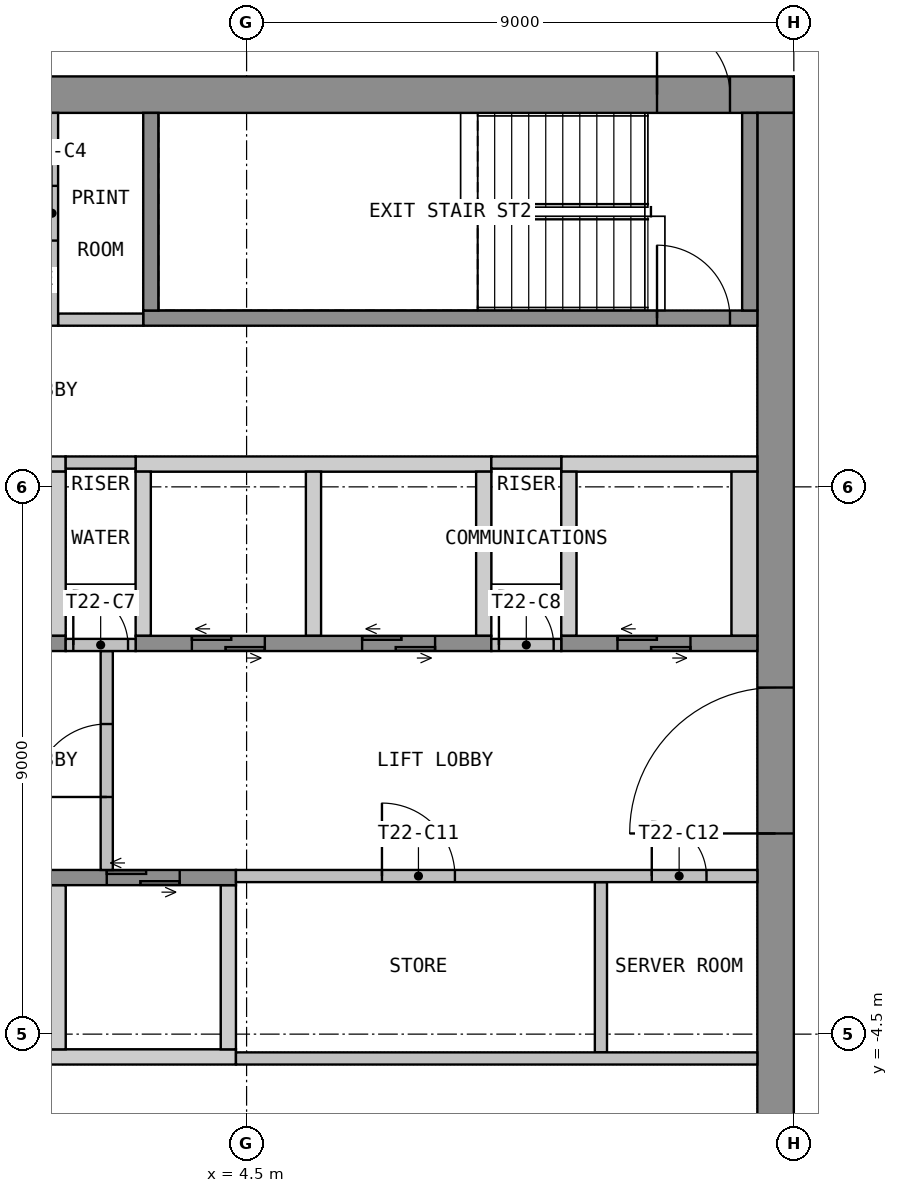
"""IFC4 building model, lengths in metres.
Left out: names, types, materials, properties, quantities, classifications, styles, units other than length and angle.
Written with IfcOpenShell. Run it as: python <this file> out.ifc"""

import sys

from ifc_helpers import new_model, si_unit, direction, frame, frame_2d, origin, place, context, subcontext, project, spatial, polyline, rectangle, outline, extrude, element, fill, save


model = new_model("IFC4")
c1 = context("Model", 3, precision=1e-05, world=origin(), true_north=direction((0.0, 1.0)))
c2 = subcontext(c1, "Body", "Model", "MODEL_VIEW")
j1 = project(units=[si_unit("LENGTHUNIT", "METRE"), si_unit("PLANEANGLEUNIT", "RADIAN")], contexts=[c1])
p1 = place(None, origin())
s1 = spatial("IfcSite", under=j1, at=p1, CompositionType="ELEMENT")
p2 = place(p1, origin())
s2 = spatial("IfcBuilding", under=s1, at=p2, CompositionType="ELEMENT")
p3 = place(p2, frame((0.0, 0.0, 298.2)))
s3 = spatial("IfcBuildingStorey", under=s2, at=p3, CompositionType="ELEMENT", Elevation=298.2)
p4 = place(p3, frame((-13.5, 10.95, 0.0), z_axis=(0.0, 0.0, 1.0), x_axis=(1.0, 0.0, 0.0)))
e1 = element("IfcWall", 1, at=p4, inside=s3, PredefinedType="SHEAR", context=c2, shape_type="SweptSolid", body=[
    extrude(rectangle(XDim=27.0, YDim=0.6, at=frame_2d((13.5, 0.0))), origin(), (0.0, 0.0, 1.0), 3.575),
])
p5 = place(p4, frame((12.3, 0.0, 0.0)))
e2 = element("IfcOpeningElement", 2, at=p5, cuts=e1, PredefinedType="OPENING", context=c2, shape_type="SweptSolid", body=[
    extrude(rectangle(XDim=2.4, YDim=2.1, at=frame_2d((1.2, 1.05))), frame((0.0, 0.31, 0.0), z_axis=(0.0, -1.0, 0.0), x_axis=(1.0, 0.0, 0.0)), (0.0, 0.0, 1.0), 0.62),
])
p6 = place(p4, frame((1.05, 0.0, 0.0)))
e3 = element("IfcOpeningElement", 3, at=p6, cuts=e1, PredefinedType="OPENING", context=c2, shape_type="SweptSolid", body=[
    extrude(rectangle(XDim=1.2, YDim=2.1, at=frame_2d((0.6, 1.05))), frame((0.0, 0.31, 0.0), z_axis=(0.0, -1.0, 0.0), x_axis=(1.0, 0.0, 0.0)), (0.0, 0.0, 1.0), 0.62),
])
p7 = place(p4, frame((24.75, 0.0, 0.0)))
e4 = element("IfcOpeningElement", 4, at=p7, cuts=e1, PredefinedType="OPENING", context=c2, shape_type="SweptSolid", body=[
    extrude(rectangle(XDim=1.2, YDim=2.1, at=frame_2d((0.6, 1.05))), frame((0.0, 0.31, 0.0), z_axis=(0.0, -1.0, 0.0), x_axis=(1.0, 0.0, 0.0)), (0.0, 0.0, 1.0), 0.62),
])
p8 = place(p3, frame((13.2, -10.65, 0.0), z_axis=(0.0, 0.0, 1.0), x_axis=(0.0, 1.0, 0.0)))
e5 = element("IfcWall", 5, at=p8, inside=s3, PredefinedType="SHEAR", context=c2, shape_type="SweptSolid", body=[
    extrude(rectangle(XDim=21.3, YDim=0.6, at=frame_2d((10.65, 0.0))), origin(), (0.0, 0.0, 1.0), 3.575),
])
p9 = place(p8, frame((9.45, 0.0, 0.0)))
e6 = element("IfcOpeningElement", 6, at=p9, cuts=e5, PredefinedType="OPENING", context=c2, shape_type="SweptSolid", body=[
    extrude(rectangle(XDim=2.4, YDim=2.1, at=frame_2d((1.2, 1.05))), frame((0.0, 0.31, 0.0), z_axis=(0.0, -1.0, 0.0), x_axis=(1.0, 0.0, 0.0)), (0.0, 0.0, 1.0), 0.62),
])
p10 = place(p3, origin())
e7 = element("IfcWall", 7, at=p10, inside=s3, PredefinedType="SHEAR", context=c2, shape_type="SweptSolid", body=[
    extrude(outline(polyline([(-1.525, 4.75), (1.525, 4.75), (1.525, 5.0), (-1.525, 5.0), (-1.525, 4.75)])), origin(), (0.0, 0.0, 1.0), 3.575),
])
p11 = place(p3, origin())
e8 = element("IfcWall", 8, at=p11, inside=s3, PredefinedType="SHEAR", context=c2, shape_type="SweptSolid", body=[
    extrude(outline(polyline([(2.675, 4.75), (8.525, 4.75), (8.525, 5.0), (2.675, 5.0), (2.675, 4.75)])), origin(), (0.0, 0.0, 1.0), 3.575),
])
p12 = place(p3, origin())
e9 = element("IfcWall", 9, at=p12, inside=s3, PredefinedType="SHEAR", context=c2, shape_type="SweptSolid", body=[
    extrude(outline(polyline([(9.675, 4.75), (12.9, 4.75), (12.9, 5.0), (9.675, 5.0), (9.675, 4.75)])), origin(), (0.0, 0.0, 1.0), 3.575),
])
p13 = place(p3, origin())
e10 = element("IfcWall", 10, at=p13, inside=s3, PredefinedType="SHEAR", context=c2, shape_type="SweptSolid", body=[
    extrude(outline(polyline([(1.275, 2.05), (1.525, 2.05), (1.525, 4.75), (1.275, 4.75), (1.275, 2.05)])), origin(), (0.0, 0.0, 1.0), 3.575),
])
p14 = place(p3, origin())
e11 = element("IfcWall", 11, at=p14, inside=s3, PredefinedType="SHEAR", context=c2, shape_type="SweptSolid", body=[
    extrude(outline(polyline([(2.675, 2.05), (2.925, 2.05), (2.925, 4.75), (2.675, 4.75), (2.675, 2.05)])), origin(), (0.0, 0.0, 1.0), 3.575),
])
p15 = place(p3, origin())
e12 = element("IfcWall", 12, at=p15, inside=s3, PredefinedType="SHEAR", context=c2, shape_type="SweptSolid", body=[
    extrude(outline(polyline([(5.475, 2.05), (5.725, 2.05), (5.725, 4.75), (5.475, 4.75), (5.475, 2.05)])), origin(), (0.0, 0.0, 1.0), 3.575),
])
p16 = place(p3, origin())
e13 = element("IfcWall", 13, at=p16, inside=s3, PredefinedType="SHEAR", context=c2, shape_type="SweptSolid", body=[
    extrude(outline(polyline([(8.275, 2.05), (8.525, 2.05), (8.525, 4.75), (8.275, 4.75), (8.275, 2.05)])), origin(), (0.0, 0.0, 1.0), 3.575),
])
p17 = place(p3, origin())
e14 = element("IfcWall", 14, at=p17, inside=s3, PredefinedType="SHEAR", context=c2, shape_type="SweptSolid", body=[
    extrude(outline(polyline([(9.675, 2.05), (9.925, 2.05), (9.925, 4.75), (9.675, 4.75), (9.675, 2.05)])), origin(), (0.0, 0.0, 1.0), 3.575),
])
p18 = place(p3, origin())
e15 = element("IfcWall", 15, at=p18, inside=s3, PredefinedType="SHEAR", context=c2, shape_type="SweptSolid", body=[
    extrude(outline(polyline([(12.475, 2.05), (12.9, 2.05), (12.9, 4.75), (12.475, 4.75), (12.475, 2.05)])), origin(), (0.0, 0.0, 1.0), 3.575),
])
p19 = place(p3, frame((-1.525, 1.925, 0.0), z_axis=(0.0, 0.0, 1.0), x_axis=(1.0, 0.0, 0.0)))
e16 = element("IfcWall", 16, at=p19, inside=s3, PredefinedType="SHEAR", context=c2, shape_type="SweptSolid", body=[
    extrude(rectangle(XDim=3.05, YDim=0.25, at=frame_2d((1.525, 0.0))), origin(), (0.0, 0.0, 1.0), 3.575),
])
p20 = place(p19, frame((0.925, 0.0, 0.0)))
e17 = element("IfcOpeningElement", 17, at=p20, cuts=e16, PredefinedType="OPENING", context=c2, shape_type="SweptSolid", body=[
    extrude(rectangle(XDim=1.2, YDim=2.1, at=frame_2d((0.6, 1.05))), frame((0.0, 0.135, 0.0), z_axis=(0.0, -1.0, 0.0), x_axis=(1.0, 0.0, 0.0)), (0.0, 0.0, 1.0), 0.27),
])
p21 = place(p3, frame((2.675, 1.925, 0.0), z_axis=(0.0, 0.0, 1.0), x_axis=(1.0, 0.0, 0.0)))
e18 = element("IfcWall", 18, at=p21, inside=s3, PredefinedType="SHEAR", context=c2, shape_type="SweptSolid", body=[
    extrude(rectangle(XDim=5.85, YDim=0.25, at=frame_2d((2.925, 0.0))), origin(), (0.0, 0.0, 1.0), 3.575),
])
p22 = place(p21, frame((0.925, 0.0, 0.0)))
e19 = element("IfcOpeningElement", 19, at=p22, cuts=e18, PredefinedType="OPENING", context=c2, shape_type="SweptSolid", body=[
    extrude(rectangle(XDim=1.2, YDim=2.1, at=frame_2d((0.6, 1.05))), frame((0.0, 0.135, 0.0), z_axis=(0.0, -1.0, 0.0), x_axis=(1.0, 0.0, 0.0)), (0.0, 0.0, 1.0), 0.27),
])
p23 = place(p21, frame((3.725, 0.0, 0.0)))
e20 = element("IfcOpeningElement", 20, at=p23, cuts=e18, PredefinedType="OPENING", context=c2, shape_type="SweptSolid", body=[
    extrude(rectangle(XDim=1.2, YDim=2.1, at=frame_2d((0.6, 1.05))), frame((0.0, 0.135, 0.0), z_axis=(0.0, -1.0, 0.0), x_axis=(1.0, 0.0, 0.0)), (0.0, 0.0, 1.0), 0.27),
])
p24 = place(p3, frame((9.675, 1.925, 0.0), z_axis=(0.0, 0.0, 1.0), x_axis=(1.0, 0.0, 0.0)))
e21 = element("IfcWall", 21, at=p24, inside=s3, PredefinedType="SHEAR", context=c2, shape_type="SweptSolid", body=[
    extrude(rectangle(XDim=3.225, YDim=0.25, at=frame_2d((1.612, 0.0))), origin(), (0.0, 0.0, 1.0), 3.575),
])
p25 = place(p24, frame((0.925, 0.0, 0.0)))
e22 = element("IfcOpeningElement", 22, at=p25, cuts=e21, PredefinedType="OPENING", context=c2, shape_type="SweptSolid", body=[
    extrude(rectangle(XDim=1.2, YDim=2.1, at=frame_2d((0.6, 1.05))), frame((0.0, 0.135, 0.0), z_axis=(0.0, -1.0, 0.0), x_axis=(1.0, 0.0, 0.0)), (0.0, 0.0, 1.0), 0.27),
])
p26 = place(p3, origin())
e23 = element("IfcWall", 23, at=p26, inside=s3, PredefinedType="SHEAR", context=c2, shape_type="SweptSolid", body=[
    extrude(outline(polyline([(-1.525, -5.0), (4.325, -5.0), (4.325, -4.75), (-1.525, -4.75), (-1.525, -5.0)])), origin(), (0.0, 0.0, 1.0), 3.575),
])
p27 = place(p3, origin())
e24 = element("IfcWall", 24, at=p27, inside=s3, PredefinedType="SHEAR", context=c2, shape_type="SweptSolid", body=[
    extrude(outline(polyline([(1.275, -4.75), (1.525, -4.75), (1.525, -2.05), (1.275, -2.05), (1.275, -4.75)])), origin(), (0.0, 0.0, 1.0), 3.575),
])
p28 = place(p3, origin())
e25 = element("IfcWall", 25, at=p28, inside=s3, PredefinedType="SHEAR", context=c2, shape_type="SweptSolid", body=[
    extrude(outline(polyline([(4.075, -4.75), (4.325, -4.75), (4.325, -2.05), (4.075, -2.05), (4.075, -4.75)])), origin(), (0.0, 0.0, 1.0), 3.575),
])
p29 = place(p3, frame((-1.525, -1.925, 0.0), z_axis=(0.0, 0.0, 1.0), x_axis=(1.0, 0.0, 0.0)))
e26 = element("IfcWall", 26, at=p29, inside=s3, PredefinedType="SHEAR", context=c2, shape_type="SweptSolid", body=[
    extrude(rectangle(XDim=5.85, YDim=0.25, at=frame_2d((2.925, 0.0))), origin(), (0.0, 0.0, 1.0), 3.575),
])
p30 = place(p29, frame((0.925, 0.0, 0.0)))
e27 = element("IfcOpeningElement", 27, at=p30, cuts=e26, PredefinedType="OPENING", context=c2, shape_type="SweptSolid", body=[
    extrude(rectangle(XDim=1.2, YDim=2.1, at=frame_2d((0.6, 1.05))), frame((0.0, 0.135, 0.0), z_axis=(0.0, -1.0, 0.0), x_axis=(1.0, 0.0, 0.0)), (0.0, 0.0, 1.0), 0.27),
])
p31 = place(p29, frame((3.725, 0.0, 0.0)))
e28 = element("IfcOpeningElement", 28, at=p31, cuts=e26, PredefinedType="OPENING", context=c2, shape_type="SweptSolid", body=[
    extrude(rectangle(XDim=1.2, YDim=2.1, at=frame_2d((0.6, 1.05))), frame((0.0, 0.135, 0.0), z_axis=(0.0, -1.0, 0.0), x_axis=(1.0, 0.0, 0.0)), (0.0, 0.0, 1.0), 0.27),
])
p32 = place(p3, frame((2.2, -1.8, 0.0), z_axis=(0.0, 0.0, 1.0), x_axis=(0.0, 1.0, 0.0)))
e29 = element("IfcWall", 29, at=p32, inside=s3, PredefinedType="PARTITIONING", context=c2, shape_type="SweptSolid", body=[
    extrude(rectangle(XDim=3.6, YDim=0.2, at=frame_2d((1.8, 0.0))), origin(), (0.0, 0.0, 1.0), 3.575),
])
p33 = place(p32, frame((1.2, 0.0, 0.0)))
e30 = element("IfcOpeningElement", 30, at=p33, cuts=e29, PredefinedType="OPENING", context=c2, shape_type="SweptSolid", body=[
    extrude(rectangle(XDim=1.2, YDim=2.1, at=frame_2d((0.6, 1.05))), frame((0.0, 0.11, 0.0), z_axis=(0.0, -1.0, 0.0), x_axis=(1.0, 0.0, 0.0)), (0.0, 0.0, 1.0), 0.22),
])
p34 = place(p3, frame((2.8, 7.275, 0.0), z_axis=(0.0, 0.0, 1.0), x_axis=(1.0, 0.0, 0.0)))
e31 = element("IfcWall", 31, at=p34, inside=s3, PredefinedType="SHEAR", context=c2, shape_type="SweptSolid", body=[
    extrude(rectangle(XDim=10.1, YDim=0.25, at=frame_2d((5.05, 0.0))), origin(), (0.0, 0.0, 1.0), 3.575),
])
p35 = place(p34, frame((8.45, 0.0, 0.0)))
e32 = element("IfcOpeningElement", 32, at=p35, cuts=e31, PredefinedType="OPENING", context=c2, shape_type="SweptSolid", body=[
    extrude(rectangle(XDim=1.2, YDim=2.1, at=frame_2d((0.6, 1.05))), frame((0.0, 0.135, 0.0), z_axis=(0.0, -1.0, 0.0), x_axis=(1.0, 0.0, 0.0)), (0.0, 0.0, 1.0), 0.27),
])
for number, where, z_axis, x_axis in (
    (33, (2.925, 7.4, 0.0), (0.0, 0.0, 1.0), (0.0, 1.0, 0.0)),
    (34, (12.775, 7.4, 0.0), (0.0, 0.0, 1.0), (0.0, 1.0, 0.0)),
):
    element("IfcWall", number, at=place(p3, frame(where, z_axis=z_axis, x_axis=x_axis)), inside=s3, PredefinedType="SHEAR", context=c2, shape_type="SweptSolid", body=[
        extrude(rectangle(XDim=3.25, YDim=0.25, at=frame_2d((1.625, 0.0))), origin(), (0.0, 0.0, 1.0), 3.575),
    ])
p36 = place(p3, frame((1.4, 7.25, 0.0), z_axis=(0.0, 0.0, 1.0), x_axis=(1.0, 0.0, 0.0)))
e35 = element("IfcWall", 35, at=p36, inside=s3, PredefinedType="PARTITIONING", context=c2, shape_type="SweptSolid", body=[
    extrude(rectangle(XDim=1.4, YDim=0.2, at=frame_2d((0.7, 0.0))), origin(), (0.0, 0.0, 1.0), 3.575),
])
p37 = place(p3, frame((1.3, 7.15, 0.0), z_axis=(0.0, 0.0, 1.0), x_axis=(0.0, 1.0, 0.0)))
e36 = element("IfcWall", 36, at=p37, inside=s3, PredefinedType="PARTITIONING", context=c2, shape_type="SweptSolid", body=[
    extrude(rectangle(XDim=3.5, YDim=0.2, at=frame_2d((1.75, 0.0))), origin(), (0.0, 0.0, 1.0), 3.575),
])
p38 = place(p37, frame((1.4, 0.0, 0.0)))
e37 = element("IfcOpeningElement", 37, at=p38, cuts=e36, PredefinedType="OPENING", context=c2, shape_type="SweptSolid", body=[
    extrude(rectangle(XDim=0.9, YDim=2.1, at=frame_2d((0.45, 1.05))), frame((0.0, 0.11, 0.0), z_axis=(0.0, -1.0, 0.0), x_axis=(1.0, 0.0, 0.0)), (0.0, 0.0, 1.0), 0.22),
])
p39 = place(p3, frame((1.525, 1.9, 0.0), z_axis=(0.0, 0.0, 1.0), x_axis=(1.0, 0.0, 0.0)))
e38 = element("IfcWall", 38, at=p39, inside=s3, PredefinedType="PARTITIONING", context=c2, shape_type="SweptSolid", body=[
    extrude(rectangle(XDim=1.15, YDim=0.2, at=frame_2d((0.575, 0.0))), origin(), (0.0, 0.0, 1.0), 3.575),
])
p40 = place(p39, frame((0.125, 0.0, 0.0)))
e39 = element("IfcOpeningElement", 39, at=p40, cuts=e38, PredefinedType="OPENING", context=c2, shape_type="SweptSolid", body=[
    extrude(rectangle(XDim=0.9, YDim=2.1, at=frame_2d((0.45, 1.05))), frame((0.0, 0.11, 0.0), z_axis=(0.0, -1.0, 0.0), x_axis=(1.0, 0.0, 0.0)), (0.0, 0.0, 1.0), 0.22),
])
p41 = place(p3, frame((1.525, 4.9, 0.0), z_axis=(0.0, 0.0, 1.0), x_axis=(1.0, 0.0, 0.0)))
e40 = element("IfcWall", 40, at=p41, inside=s3, PredefinedType="PARTITIONING", context=c2, shape_type="SweptSolid", body=[
    extrude(rectangle(XDim=1.15, YDim=0.2, at=frame_2d((0.575, 0.0))), origin(), (0.0, 0.0, 1.0), 3.575),
])
p42 = place(p3, frame((8.525, 1.9, 0.0), z_axis=(0.0, 0.0, 1.0), x_axis=(1.0, 0.0, 0.0)))
e41 = element("IfcWall", 41, at=p42, inside=s3, PredefinedType="PARTITIONING", context=c2, shape_type="SweptSolid", body=[
    extrude(rectangle(XDim=1.15, YDim=0.2, at=frame_2d((0.575, 0.0))), origin(), (0.0, 0.0, 1.0), 3.575),
])
p43 = place(p42, frame((0.125, 0.0, 0.0)))
e42 = element("IfcOpeningElement", 42, at=p43, cuts=e41, PredefinedType="OPENING", context=c2, shape_type="SweptSolid", body=[
    extrude(rectangle(XDim=0.9, YDim=2.1, at=frame_2d((0.45, 1.05))), frame((0.0, 0.11, 0.0), z_axis=(0.0, -1.0, 0.0), x_axis=(1.0, 0.0, 0.0)), (0.0, 0.0, 1.0), 0.22),
])
p44 = place(p3, frame((8.525, 4.9, 0.0), z_axis=(0.0, 0.0, 1.0), x_axis=(1.0, 0.0, 0.0)))
e43 = element("IfcWall", 43, at=p44, inside=s3, PredefinedType="PARTITIONING", context=c2, shape_type="SweptSolid", body=[
    extrude(rectangle(XDim=1.15, YDim=0.2, at=frame_2d((0.575, 0.0))), origin(), (0.0, 0.0, 1.0), 3.575),
])
p45 = place(p3, frame((10.327, -4.8, 0.0), z_axis=(0.0, 0.0, 1.0), x_axis=(0.0, 1.0, 0.0)))
e44 = element("IfcWall", 44, at=p45, inside=s3, PredefinedType="PARTITIONING", context=c2, shape_type="SweptSolid", body=[
    extrude(rectangle(XDim=2.8, YDim=0.2, at=frame_2d((1.4, 0.0))), origin(), (0.0, 0.0, 1.0), 3.575),
])
p46 = place(p3, frame((4.325, -1.9, 0.0), z_axis=(0.0, 0.0, 1.0), x_axis=(1.0, 0.0, 0.0)))
e45 = element("IfcWall", 45, at=p46, inside=s3, PredefinedType="PARTITIONING", context=c2, shape_type="SweptSolid", body=[
    extrude(rectangle(XDim=8.575, YDim=0.2, at=frame_2d((4.288, 0.0))), origin(), (0.0, 0.0, 1.0), 3.575),
])
p47 = place(p46, frame((2.401, 0.0, 0.0)))
e46 = element("IfcOpeningElement", 46, at=p47, cuts=e45, PredefinedType="OPENING", context=c2, shape_type="SweptSolid", body=[
    extrude(rectangle(XDim=1.2, YDim=2.1, at=frame_2d((0.6, 1.05))), frame((0.0, 0.11, 0.0), z_axis=(0.0, -1.0, 0.0), x_axis=(1.0, 0.0, 0.0)), (0.0, 0.0, 1.0), 0.22),
])
p48 = place(p46, frame((6.839, 0.0, 0.0)))
e47 = element("IfcOpeningElement", 47, at=p48, cuts=e45, PredefinedType="OPENING", context=c2, shape_type="SweptSolid", body=[
    extrude(rectangle(XDim=0.9, YDim=2.1, at=frame_2d((0.45, 1.05))), frame((0.0, 0.11, 0.0), z_axis=(0.0, -1.0, 0.0), x_axis=(1.0, 0.0, 0.0)), (0.0, 0.0, 1.0), 0.22),
])
p49 = place(p3, frame((4.325, -4.9, 0.0), z_axis=(0.0, 0.0, 1.0), x_axis=(1.0, 0.0, 0.0)))
e48 = element("IfcWall", 48, at=p49, inside=s3, PredefinedType="PARTITIONING", context=c2, shape_type="SweptSolid", body=[
    extrude(rectangle(XDim=8.575, YDim=0.2, at=frame_2d((4.288, 0.0))), origin(), (0.0, 0.0, 1.0), 3.575),
])
p50 = place(p9, origin())
e49 = element("IfcDoor", 49, at=p50, inside=s3, OperationType="DOUBLE_DOOR_DOUBLE_SWING", PredefinedType="DOOR", context=c2, shape_type="SweptSolid", body=[
    extrude(rectangle(XDim=2.4, YDim=2.1, at=frame_2d((1.2, 1.05))), frame((0.0, 0.025, 0.0), z_axis=(0.0, -1.0, 0.0), x_axis=(1.0, 0.0, 0.0)), (0.0, 0.0, 1.0), 0.05),
])
fill(e6, e49)
p51 = place(p7, origin())
e50 = element("IfcDoor", 50, at=p51, inside=s3, OperationType="SINGLE_SWING_RIGHT", PredefinedType="DOOR", context=c2, shape_type="SweptSolid", body=[
    extrude(rectangle(XDim=1.2, YDim=2.1, at=frame_2d((0.6, 1.05))), frame((0.0, 0.025, 0.0), z_axis=(0.0, -1.0, 0.0), x_axis=(1.0, 0.0, 0.0)), (0.0, 0.0, 1.0), 0.05),
])
fill(e4, e50)
p52 = place(p22, origin())
e51 = element("IfcDoor", 51, at=p52, inside=s3, OperationType="DOUBLE_DOOR_SLIDING", PredefinedType="DOOR", context=c2, shape_type="SweptSolid", body=[
    extrude(rectangle(XDim=1.2, YDim=2.1, at=frame_2d((0.6, 1.05))), frame((0.0, 0.025, 0.0), z_axis=(0.0, -1.0, 0.0), x_axis=(1.0, 0.0, 0.0)), (0.0, 0.0, 1.0), 0.05),
])
fill(e19, e51)
p53 = place(p23, origin())
e52 = element("IfcDoor", 52, at=p53, inside=s3, OperationType="DOUBLE_DOOR_SLIDING", PredefinedType="DOOR", context=c2, shape_type="SweptSolid", body=[
    extrude(rectangle(XDim=1.2, YDim=2.1, at=frame_2d((0.6, 1.05))), frame((0.0, 0.025, 0.0), z_axis=(0.0, -1.0, 0.0), x_axis=(1.0, 0.0, 0.0)), (0.0, 0.0, 1.0), 0.05),
])
fill(e20, e52)
p54 = place(p25, origin())
e53 = element("IfcDoor", 53, at=p54, inside=s3, OperationType="DOUBLE_DOOR_SLIDING", PredefinedType="DOOR", context=c2, shape_type="SweptSolid", body=[
    extrude(rectangle(XDim=1.2, YDim=2.1, at=frame_2d((0.6, 1.05))), frame((0.0, 0.025, 0.0), z_axis=(0.0, -1.0, 0.0), x_axis=(1.0, 0.0, 0.0)), (0.0, 0.0, 1.0), 0.05),
])
fill(e22, e53)
p55 = place(p31, origin())
e54 = element("IfcDoor", 54, at=p55, inside=s3, OperationType="DOUBLE_DOOR_SLIDING", PredefinedType="DOOR", context=c2, shape_type="SweptSolid", body=[
    extrude(rectangle(XDim=1.2, YDim=2.1, at=frame_2d((0.6, 1.05))), frame((0.0, 0.025, 0.0), z_axis=(0.0, -1.0, 0.0), x_axis=(1.0, 0.0, 0.0)), (0.0, 0.0, 1.0), 0.05),
])
fill(e28, e54)
p56 = place(p33, origin())
e55 = element("IfcDoor", 55, at=p56, inside=s3, OperationType="SINGLE_SWING_LEFT", PredefinedType="DOOR", context=c2, shape_type="SweptSolid", body=[
    extrude(rectangle(XDim=1.2, YDim=2.1, at=frame_2d((0.6, 1.05))), frame((0.0, 0.025, 0.0), z_axis=(0.0, -1.0, 0.0), x_axis=(1.0, 0.0, 0.0)), (0.0, 0.0, 1.0), 0.05),
])
fill(e30, e55)
p57 = place(p35, origin())
e56 = element("IfcDoor", 56, at=p57, inside=s3, OperationType="SINGLE_SWING_LEFT", PredefinedType="DOOR", context=c2, shape_type="SweptSolid", body=[
    extrude(rectangle(XDim=1.2, YDim=2.1, at=frame_2d((0.6, 1.05))), frame((0.0, 0.025, 0.0), z_axis=(0.0, -1.0, 0.0), x_axis=(1.0, 0.0, 0.0)), (0.0, 0.0, 1.0), 0.05),
])
fill(e32, e56)
p58 = place(p38, origin())
e57 = element("IfcDoor", 57, at=p58, inside=s3, OperationType="SINGLE_SWING_LEFT", PredefinedType="DOOR", context=c2, shape_type="SweptSolid", body=[
    extrude(rectangle(XDim=0.9, YDim=2.1, at=frame_2d((0.45, 1.05))), frame((0.0, 0.025, 0.0), z_axis=(0.0, -1.0, 0.0), x_axis=(1.0, 0.0, 0.0)), (0.0, 0.0, 1.0), 0.05),
])
fill(e37, e57)
p59 = place(p40, origin())
e58 = element("IfcDoor", 58, at=p59, inside=s3, OperationType="SINGLE_SWING_LEFT", PredefinedType="DOOR", context=c2, shape_type="SweptSolid", body=[
    extrude(rectangle(XDim=0.9, YDim=2.1, at=frame_2d((0.45, 1.05))), frame((0.0, 0.025, 0.0), z_axis=(0.0, -1.0, 0.0), x_axis=(1.0, 0.0, 0.0)), (0.0, 0.0, 1.0), 0.05),
])
fill(e39, e58)
p60 = place(p43, origin())
e59 = element("IfcDoor", 59, at=p60, inside=s3, OperationType="SINGLE_SWING_LEFT", PredefinedType="DOOR", context=c2, shape_type="SweptSolid", body=[
    extrude(rectangle(XDim=0.9, YDim=2.1, at=frame_2d((0.45, 1.05))), frame((0.0, 0.025, 0.0), z_axis=(0.0, -1.0, 0.0), x_axis=(1.0, 0.0, 0.0)), (0.0, 0.0, 1.0), 0.05),
])
fill(e42, e59)
p61 = place(p47, origin())
e60 = element("IfcDoor", 60, at=p61, inside=s3, OperationType="SINGLE_SWING_RIGHT", PredefinedType="DOOR", context=c2, shape_type="SweptSolid", body=[
    extrude(rectangle(XDim=1.2, YDim=2.1, at=frame_2d((0.6, 1.05))), frame((0.0, 0.025, 0.0), z_axis=(0.0, -1.0, 0.0), x_axis=(1.0, 0.0, 0.0)), (0.0, 0.0, 1.0), 0.05),
])
fill(e46, e60)
p62 = place(p48, origin())
e61 = element("IfcDoor", 61, at=p62, inside=s3, OperationType="SINGLE_SWING_LEFT", PredefinedType="DOOR", context=c2, shape_type="SweptSolid", body=[
    extrude(rectangle(XDim=0.9, YDim=2.1, at=frame_2d((0.45, 1.05))), frame((0.0, 0.025, 0.0), z_axis=(0.0, -1.0, 0.0), x_axis=(1.0, 0.0, 0.0)), (0.0, 0.0, 1.0), 0.05),
])
fill(e47, e61)
save(model, sys.argv[1])
